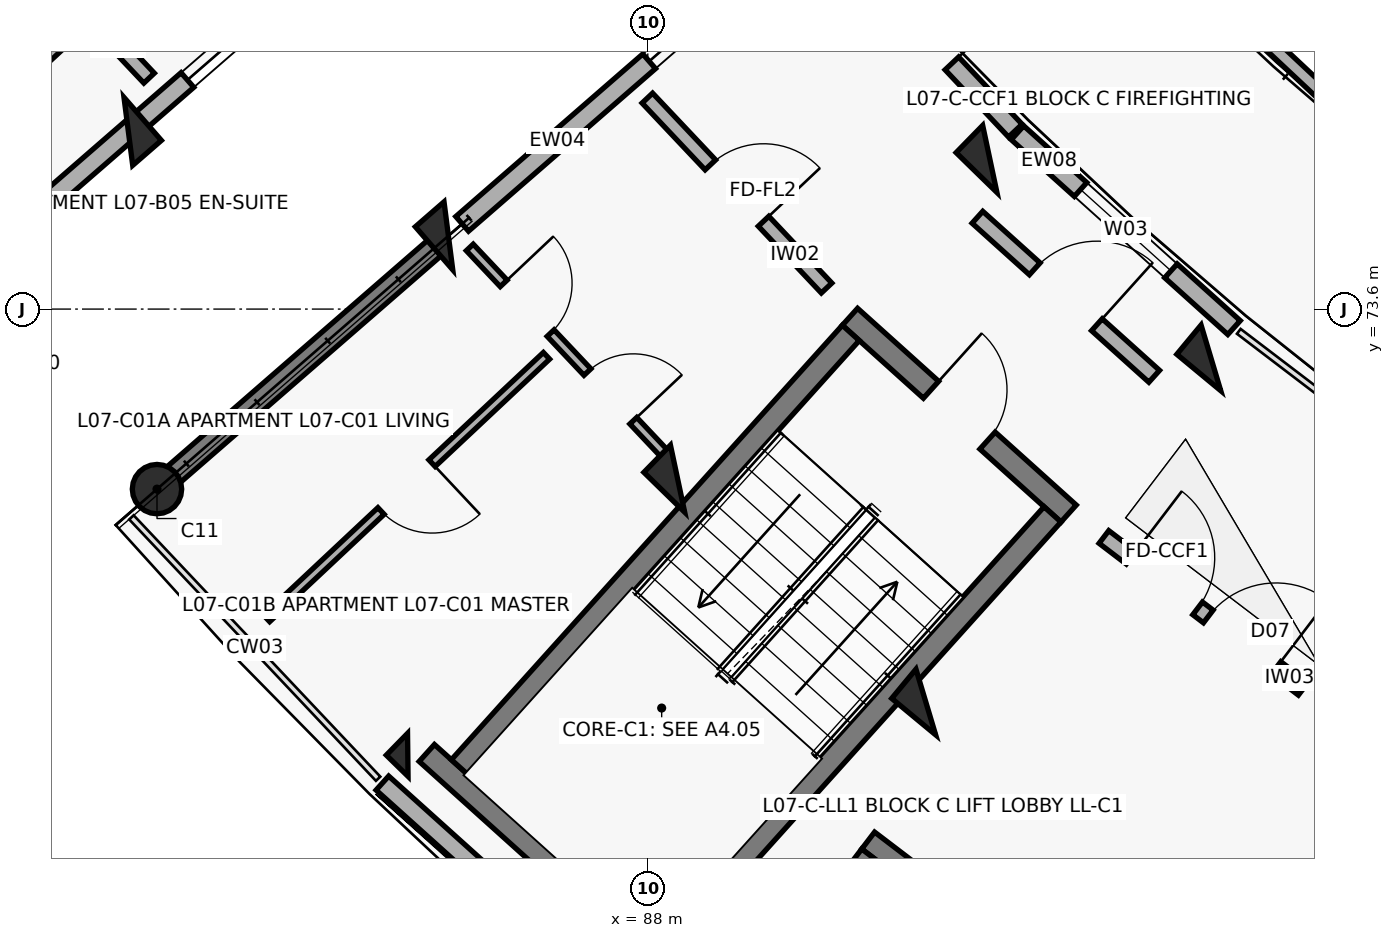
"""IFC4 building model, lengths in metres.
Left out: names, types, materials, properties, quantities, classifications, styles, units other than length and angle.
Written with IfcOpenShell. Run it as: python <this file> out.ifc"""

import sys

from ifc_helpers import new_model, si_unit, direction, frame, frame_2d, origin, origin_2d, place, context, subcontext, project, spatial, rectangle, circle, extrude, element, fill, save


model = new_model("IFC4")
c1 = context("Model", 3, precision=1e-05, world=origin(), true_north=direction((0.0, 1.0)))
c2 = subcontext(c1, "Body", "Model", "MODEL_VIEW")
j1 = project(units=[si_unit("LENGTHUNIT", "METRE"), si_unit("PLANEANGLEUNIT", "RADIAN")], contexts=[c1])
p1 = place(None, origin())
s1 = spatial("IfcSite", under=j1, at=p1, CompositionType="ELEMENT")
p2 = place(p1, origin())
s2 = spatial("IfcBuilding", under=s1, at=p2, CompositionType="ELEMENT")
p3 = place(p2, frame((0.0, 0.0, 23.6)))
s3 = spatial("IfcBuildingStorey", under=s2, at=p3, CompositionType="ELEMENT", Elevation=23.6)
for number, where, z_axis, x_axis in (
    (1, (81.166, 75.938, 0.0), (0.0, 0.0, 1.0), (0.755, 0.656, 0.0)),
    (2, (85.377, 74.564, 0.0), (0.0, 0.0, 1.0), (-0.755, -0.656, 0.0)),
):
    element("IfcColumn", number, at=place(p3, frame(where, z_axis=z_axis, x_axis=x_axis)), inside=s3, PredefinedType="COLUMN", context=c2, shape_type="SweptSolid", body=[
        extrude(rectangle(XDim=0.5, YDim=0.75, at=origin_2d()), origin(), (0.0, 0.0, 1.0), 3.1),
    ])
p4 = place(p3, frame((81.543, 71.231, 0.0), z_axis=(0.0, 0.0, 1.0), x_axis=(-0.754709580223, -0.656059028991, 0.0)))
e3 = element("IfcColumn", 3, at=p4, inside=s3, PredefinedType="COLUMN", context=c2, shape_type="SweptSolid", body=[
    extrude(circle(Radius=0.325, at=origin_2d()), origin(), (0.0, 0.0, 1.0), 3.1),
])
for number, where, z_axis, x_axis in (
    (4, (92.5, 75.576, 0.0), (0.0, 0.0, 1.0), (-0.699, -0.715, 0.0)),
    (5, (88.392, 71.369, 0.0), (0.0, 0.0, 1.0), (-0.699, -0.715, 0.0)),
):
    element("IfcColumn", number, at=place(p3, frame(where, z_axis=z_axis, x_axis=x_axis)), inside=s3, PredefinedType="COLUMN", context=c2, shape_type="SweptSolid", body=[
        extrude(rectangle(XDim=0.5, YDim=0.75, at=origin_2d()), origin(), (0.0, 0.0, 1.0), 3.1),
    ])
p5 = place(p3, frame((84.843, 67.734, 0.0), z_axis=(0.0, 0.0, 1.0), x_axis=(-0.698665066769, -0.715448897181, 0.0)))
e6 = element("IfcColumn", 6, at=p5, inside=s3, PredefinedType="COLUMN", context=c2, shape_type="SweptSolid", body=[
    extrude(rectangle(XDim=0.4, YDim=0.4, at=origin_2d()), origin(), (0.0, 0.0, 1.0), 3.1),
])
for number, where, z_axis, x_axis in (
    (7, (95.409, 72.958, 0.0), (0.0, 0.0, 1.0), (-0.638, -0.77, 0.0)),
    (8, (91.658, 68.43, 0.0), (0.0, 0.0, 1.0), (-0.638, -0.77, 0.0)),
):
    element("IfcColumn", number, at=place(p3, frame(where, z_axis=z_axis, x_axis=x_axis)), inside=s3, PredefinedType="COLUMN", context=c2, shape_type="SweptSolid", body=[
        extrude(rectangle(XDim=0.5, YDim=0.75, at=origin_2d()), origin(), (0.0, 0.0, 1.0), 3.1),
    ])
p6 = place(p3, frame((85.241, 74.446, 0.0), z_axis=(0.0, 0.0, 1.0), x_axis=(-0.754703505217, -0.65606601742, 0.0)))
e9 = element("IfcWall", 9, at=p6, inside=s3, PredefinedType="SHEAR", context=c2, shape_type="SweptSolid", body=[
    extrude(rectangle(XDim=4.72, YDim=0.27, at=frame_2d((2.36, 0.0))), origin(), (0.0, 0.0, 1.0), 2.86),
])
p7 = place(p3, frame((79.234, 74.259, 0.0), z_axis=(0.0, 0.0, 1.0), x_axis=(0.754717680958, 0.656049710044, 0.0)))
e10 = element("IfcWall", 10, at=p7, inside=s3, PredefinedType="SOLIDWALL", context=c2, shape_type="SweptSolid", body=[
    extrude(rectangle(XDim=8.2, YDim=0.255, at=frame_2d((4.1, 0.0))), origin(), (0.0, 0.0, 1.0), 2.18),
])
p8 = place(p7, frame((3.59, 0.0, 0.75)))
e11 = element("IfcOpeningElement", 11, at=p8, cuts=e10, PredefinedType="OPENING", context=c2, shape_type="SweptSolid", body=[
    extrude(rectangle(XDim=1.35, YDim=1.35, at=frame_2d((0.675, 0.675))), frame((0.0, 0.137, 0.0), z_axis=(0.0, -1.0, 0.0), x_axis=(1.0, 0.0, 0.0)), (0.0, 0.0, 1.0), 0.275),
])
p9 = place(p3, frame((90.205, 78.735, 0.0), z_axis=(0.0, 0.0, 1.0), x_axis=(0.686361600129, -0.727260444317, 0.0)))
e12 = element("IfcWall", 12, at=p9, inside=s3, PredefinedType="SOLIDWALL", context=c2, shape_type="SweptSolid", body=[
    extrude(rectangle(XDim=3.832, YDim=0.245, at=frame_2d((1.916, 0.0))), origin(), (0.0, 0.0, 1.0), 2.25),
])
p10 = place(p9, frame((1.216, 0.0, 0.0)))
e13 = element("IfcOpeningElement", 13, at=p10, cuts=e12, PredefinedType="OPENING", context=c2, shape_type="SweptSolid", body=[
    extrude(rectangle(XDim=1.4, YDim=2.15, at=frame_2d((0.7, 1.075))), frame((0.0, 0.133, 0.0), z_axis=(0.0, -1.0, 0.0), x_axis=(1.0, 0.0, 0.0)), (0.0, 0.0, 1.0), 0.265),
])
p11 = place(p3, frame((84.508, 67.363, 0.0), z_axis=(0.0, 0.0, 1.0), x_axis=(0.743387539862, -0.668860946369, 0.0)))
e14 = element("IfcWall", 14, at=p11, inside=s3, PredefinedType="SOLIDWALL", context=c2, shape_type="SweptSolid", body=[
    extrude(rectangle(XDim=4.809, YDim=0.248, at=frame_2d((2.405, 0.0))), origin(), (0.0, 0.0, 1.0), 2.25),
])
p12 = place(p3, frame((92.864, 75.92, 0.0), z_axis=(0.0, 0.0, 1.0), x_axis=(0.743363835609, -0.668887290886, 0.0)))
e15 = element("IfcWall", 15, at=p12, inside=s3, PredefinedType="SOLIDWALL", context=c2, shape_type="SweptSolid", body=[
    extrude(rectangle(XDim=3.832, YDim=0.245, at=frame_2d((1.916, 0.0))), origin(), (0.0, 0.0, 1.0), 2.25),
])
p13 = place(p12, frame((1.116, 0.0, 0.32)))
e16 = element("IfcOpeningElement", 16, at=p13, cuts=e15, PredefinedType="OPENING", context=c2, shape_type="SweptSolid", body=[
    extrude(rectangle(XDim=1.6, YDim=1.5, at=frame_2d((0.8, 0.75))), frame((0.0, 0.133, 0.0), z_axis=(0.0, -1.0, 0.0), x_axis=(1.0, 0.0, 0.0)), (0.0, 0.0, 1.0), 0.265),
])
p14 = place(p3, frame((89.633, 78.264, 0.0), z_axis=(0.0, 0.0, 1.0), x_axis=(-0.754709658894, -0.65605893849, 0.0)))
e17 = element("IfcWall", 17, at=p14, inside=s3, PredefinedType="SOLIDWALL", context=c2, shape_type="SweptSolid", body=[
    extrude(rectangle(XDim=5.4, YDim=0.255, at=frame_2d((2.7, 0.0))), origin(), (0.0, 0.0, 1.0), 2.18),
])
p15 = place(p14, frame((0.79, 0.0, 0.75)))
e18 = element("IfcOpeningElement", 18, at=p15, cuts=e17, PredefinedType="OPENING", context=c2, shape_type="SweptSolid", body=[
    extrude(rectangle(XDim=1.35, YDim=1.35, at=frame_2d((0.675, 0.675))), frame((0.0, 0.137, 0.0), z_axis=(0.0, -1.0, 0.0), x_axis=(1.0, 0.0, 0.0)), (0.0, 0.0, 1.0), 0.275),
])
p16 = place(p3, frame((92.38, 80.652, 0.0), z_axis=(0.0, 0.0, 1.0), x_axis=(0.729564048979, -0.68391249326, 0.0)))
e19 = element("IfcWall", 19, at=p16, inside=s3, PredefinedType="PARAPET", context=c2, shape_type="SweptSolid", body=[
    extrude(rectangle(XDim=9.075, YDim=0.18, at=frame_2d((4.538, 0.0))), origin(), (0.0, 0.0, 1.0), 0.25),
])
p17 = place(p3, frame((90.66, 73.499, 0.0), z_axis=(0.0, 0.0, 1.0), x_axis=(0.743375696158, -0.668874109501, 0.0)))
e20 = element("IfcWall", 20, at=p17, inside=s3, PredefinedType="SHEAR", context=c2, shape_type="SweptSolid", body=[
    extrude(rectangle(XDim=3.87, YDim=0.3, at=frame_2d((1.935, 0.0))), origin(), (0.0, 0.0, 1.0), 3.1),
])
p18 = place(p17, frame((1.435, 0.0, 0.0)))
e21 = element("IfcOpeningElement", 21, at=p18, cuts=e20, PredefinedType="OPENING", context=c2, shape_type="SweptSolid", body=[
    extrude(rectangle(XDim=1.0, YDim=2.15, at=frame_2d((0.5, 1.075))), frame((0.0, 0.16, 0.0), z_axis=(0.0, -1.0, 0.0), x_axis=(1.0, 0.0, 0.0)), (0.0, 0.0, 1.0), 0.32),
])
p19 = place(p3, frame((85.093, 67.76, 0.0), z_axis=(0.0, 0.0, 1.0), x_axis=(0.743372896184, -0.668877221333, 0.0)))
e22 = element("IfcWall", 22, at=p19, inside=s3, PredefinedType="SHEAR", context=c2, shape_type="SweptSolid", body=[
    extrude(rectangle(XDim=4.47, YDim=0.3, at=frame_2d((2.235, 0.0))), origin(), (0.0, 0.0, 1.0), 3.1),
])
p20 = place(p3, frame((90.671, 73.287, 0.0), z_axis=(0.0, 0.0, 1.0), x_axis=(-0.668885797871, -0.743365179038, 0.0)))
e23 = element("IfcWall", 23, at=p20, inside=s3, PredefinedType="SHEAR", context=c2, shape_type="SweptSolid", body=[
    extrude(rectangle(XDim=7.69, YDim=0.3, at=frame_2d((3.845, 0.0))), origin(), (0.0, 0.0, 1.0), 3.1),
])
p21 = place(p3, frame((93.325, 70.899, 0.0), z_axis=(0.0, 0.0, 1.0), x_axis=(-0.668868253964, -0.743380964808, 0.0)))
e24 = element("IfcWall", 24, at=p21, inside=s3, PredefinedType="SHEAR", context=c2, shape_type="SweptSolid", body=[
    extrude(rectangle(XDim=7.69, YDim=0.3, at=frame_2d((3.845, 0.0))), origin(), (0.0, 0.0, 1.0), 3.1),
])
p22 = place(p3, frame((90.899, 66.607, 0.0), z_axis=(0.0, 0.0, 1.0), x_axis=(0.795439986025, -0.606032365994, 0.0)))
e25 = element("IfcWall", 25, at=p22, inside=s3, PredefinedType="SHEAR", context=c2, shape_type="SweptSolid", body=[
    extrude(rectangle(XDim=3.39, YDim=0.28, at=frame_2d((1.695, 0.0))), origin(), (0.0, 0.0, 1.0), 3.1),
])
p23 = place(p22, frame((1.095, 0.0, 0.0)))
e26 = element("IfcOpeningElement", 26, at=p23, cuts=e25, PredefinedType="OPENING", context=c2, shape_type="SweptSolid", body=[
    extrude(rectangle(XDim=1.2, YDim=2.15, at=frame_2d((0.6, 1.075))), frame((0.0, 0.15, 0.0), z_axis=(0.0, -1.0, 0.0), x_axis=(1.0, 0.0, 0.0)), (0.0, 0.0, 1.0), 0.3),
])
p24 = place(p3, frame((90.926, 66.411, 0.0), z_axis=(0.0, 0.0, 1.0), x_axis=(-0.605948992168, -0.795503500238, 0.0)))
e27 = element("IfcWall", 27, at=p24, inside=s3, PredefinedType="SHEAR", context=c2, shape_type="SweptSolid", body=[
    extrude(rectangle(XDim=2.03, YDim=0.28, at=frame_2d((1.015, 0.0))), origin(), (0.0, 0.0, 1.0), 3.1),
])
p25 = place(p3, frame((79.195, 79.016, 0.0), z_axis=(0.0, 0.0, 1.0), x_axis=(0.686307658735, -0.727311348434, 0.0)))
e28 = element("IfcWall", 28, at=p25, inside=s3, PredefinedType="SOLIDWALL", context=c2, shape_type="SweptSolid", body=[
    extrude(rectangle(XDim=3.269, YDim=0.19, at=frame_2d((1.634, 0.0))), origin(), (0.0, 0.0, 1.0), 2.08),
])
p26 = place(p25, frame((1.184, 0.0, 0.0)))
e29 = element("IfcOpeningElement", 29, at=p26, cuts=e28, PredefinedType="OPENING", context=c2, shape_type="SweptSolid", body=[
    extrude(rectangle(XDim=0.9, YDim=2.1, at=frame_2d((0.45, 1.05))), frame((0.0, 0.105, 0.0), z_axis=(0.0, -1.0, 0.0), x_axis=(1.0, 0.0, 0.0)), (0.0, 0.0, 1.0), 0.21),
])
p27 = place(p3, frame((78.163, 75.139, 0.0), z_axis=(0.0, 0.0, 1.0), x_axis=(0.734519733107, 0.678587327967, 0.0)))
e30 = element("IfcWall", 30, at=p27, inside=s3, PredefinedType="PARTITIONING", context=c2, shape_type="SweptSolid", body=[
    extrude(rectangle(XDim=3.3, YDim=0.145, at=frame_2d((1.65, 0.0))), origin(), (0.0, 0.0, 1.0), 2.08),
])
p28 = place(p27, frame((1.21, 0.0, 0.0)))
e31 = element("IfcOpeningElement", 31, at=p28, cuts=e30, PredefinedType="OPENING", context=c2, shape_type="SweptSolid", body=[
    extrude(rectangle(XDim=0.88, YDim=2.1, at=frame_2d((0.44, 1.05))), frame((0.0, 0.083, 0.0), z_axis=(0.0, -1.0, 0.0), x_axis=(1.0, 0.0, 0.0)), (0.0, 0.0, 1.0), 0.165),
])
p29 = place(p3, frame((87.994, 76.376, 0.0), z_axis=(0.0, 0.0, 1.0), x_axis=(0.686310507227, -0.727308660522, 0.0)))
e32 = element("IfcWall", 32, at=p29, inside=s3, PredefinedType="SOLIDWALL", context=c2, shape_type="SweptSolid", body=[
    extrude(rectangle(XDim=3.436, YDim=0.19, at=frame_2d((1.718, 0.0))), origin(), (0.0, 0.0, 1.0), 2.08),
])
p30 = place(p29, frame((1.208, 0.0, 0.0)))
e33 = element("IfcOpeningElement", 33, at=p30, cuts=e32, PredefinedType="OPENING", context=c2, shape_type="SweptSolid", body=[
    extrude(rectangle(XDim=1.02, YDim=2.15, at=frame_2d((0.51, 1.075))), frame((0.0, 0.105, 0.0), z_axis=(0.0, -1.0, 0.0), x_axis=(1.0, 0.0, 0.0)), (0.0, 0.0, 1.0), 0.21),
])
p31 = place(p3, frame((85.658, 74.411, 0.0), z_axis=(0.0, 0.0, 1.0), x_axis=(0.686364008772, -0.727258171121, 0.0)))
e34 = element("IfcWall", 34, at=p31, inside=s3, PredefinedType="PARTITIONING", context=c2, shape_type="SweptSolid", body=[
    extrude(rectangle(XDim=3.785, YDim=0.125, at=frame_2d((1.893, 0.0))), origin(), (0.0, 0.0, 1.0), 2.08),
])
p32 = place(p31, frame((0.65, 0.0, 0.0)))
e35 = element("IfcOpeningElement", 35, at=p32, cuts=e34, PredefinedType="OPENING", context=c2, shape_type="SweptSolid", body=[
    extrude(rectangle(XDim=0.9, YDim=2.1, at=frame_2d((0.45, 1.05))), frame((0.0, 0.073, 0.0), z_axis=(0.0, -1.0, 0.0), x_axis=(1.0, 0.0, 0.0)), (0.0, 0.0, 1.0), 0.145),
])
p33 = place(p31, frame((2.255, 0.0, 0.0)))
e36 = element("IfcOpeningElement", 36, at=p33, cuts=e34, PredefinedType="OPENING", context=c2, shape_type="SweptSolid", body=[
    extrude(rectangle(XDim=0.88, YDim=2.1, at=frame_2d((0.44, 1.05))), frame((0.0, 0.073, 0.0), z_axis=(0.0, -1.0, 0.0), x_axis=(1.0, 0.0, 0.0)), (0.0, 0.0, 1.0), 0.145),
])
p34 = place(p3, frame((86.667, 72.985, 0.0), z_axis=(0.0, 0.0, 1.0), x_axis=(-0.72936983679, -0.684119610288, 0.0)))
e37 = element("IfcWall", 37, at=p34, inside=s3, PredefinedType="PARTITIONING", context=c2, shape_type="SweptSolid", body=[
    extrude(rectangle(XDim=5.05, YDim=0.12, at=frame_2d((2.525, 0.0))), origin(), (0.0, 0.0, 1.0), 2.08),
])
p35 = place(p34, frame((2.065, 0.0, 0.0)))
e38 = element("IfcOpeningElement", 38, at=p35, cuts=e37, PredefinedType="OPENING", context=c2, shape_type="SweptSolid", body=[
    extrude(rectangle(XDim=0.92, YDim=2.1, at=frame_2d((0.46, 1.05))), frame((0.0, 0.07, 0.0), z_axis=(0.0, -1.0, 0.0), x_axis=(1.0, 0.0, 0.0)), (0.0, 0.0, 1.0), 0.14),
])
p36 = place(p3, frame((92.337, 74.808, 0.0), z_axis=(0.0, 0.0, 1.0), x_axis=(0.743348465558, -0.668904371904, 0.0)))
e39 = element("IfcWall", 39, at=p36, inside=s3, PredefinedType="SOLIDWALL", context=c2, shape_type="SweptSolid", body=[
    extrude(rectangle(XDim=3.129, YDim=0.21, at=frame_2d((1.564, 0.0))), origin(), (0.0, 0.0, 1.0), 2.08),
])
p37 = place(p36, frame((1.014, 0.0, 0.0)))
e40 = element("IfcOpeningElement", 40, at=p37, cuts=e39, PredefinedType="OPENING", context=c2, shape_type="SweptSolid", body=[
    extrude(rectangle(XDim=1.1, YDim=2.15, at=frame_2d((0.55, 1.075))), frame((0.0, 0.115, 0.0), z_axis=(0.0, -1.0, 0.0), x_axis=(1.0, 0.0, 0.0)), (0.0, 0.0, 1.0), 0.23),
])
p38 = place(p3, frame((94.001, 70.602, 0.0), z_axis=(0.0, 0.0, 1.0), x_axis=(0.795498026433, -0.605956178235, 0.0)))
e41 = element("IfcWall", 41, at=p38, inside=s3, PredefinedType="SOLIDWALL", context=c2, shape_type="SweptSolid", body=[
    extrude(rectangle(XDim=3.296, YDim=0.21, at=frame_2d((1.648, 0.0))), origin(), (0.0, 0.0, 1.0), 2.08),
])
p39 = place(p38, frame((0.45, 0.0, 0.0)))
e42 = element("IfcOpeningElement", 42, at=p39, cuts=e41, PredefinedType="OPENING", context=c2, shape_type="SweptSolid", body=[
    extrude(rectangle(XDim=1.1, YDim=2.15, at=frame_2d((0.55, 1.075))), frame((0.0, 0.115, 0.0), z_axis=(0.0, -1.0, 0.0), x_axis=(1.0, 0.0, 0.0)), (0.0, 0.0, 1.0), 0.23),
])
p40 = place(p38, frame((1.726, 0.0, 0.0)))
e43 = element("IfcOpeningElement", 43, at=p40, cuts=e41, PredefinedType="OPENING", context=c2, shape_type="SweptSolid", body=[
    extrude(rectangle(XDim=1.12, YDim=2.15, at=frame_2d((0.56, 1.075))), frame((0.0, 0.115, 0.0), z_axis=(0.0, -1.0, 0.0), x_axis=(1.0, 0.0, 0.0)), (0.0, 0.0, 1.0), 0.23),
])
p41 = place(p3, frame((98.504, 67.072, 0.0), z_axis=(0.0, 0.0, 1.0), x_axis=(-0.540338452216, -0.841447774408, 0.0)))
e44 = element("IfcWall", 44, at=p41, inside=s3, PredefinedType="PARTITIONING", context=c2, shape_type="SweptSolid", body=[
    extrude(rectangle(XDim=7.95, YDim=0.14, at=frame_2d((3.975, 0.0))), origin(), (0.0, 0.0, 1.0), 2.08),
])
p42 = place(p41, frame((6.05, 0.0, 0.0)))
e45 = element("IfcOpeningElement", 45, at=p42, cuts=e44, PredefinedType="OPENING", context=c2, shape_type="SweptSolid", body=[
    extrude(rectangle(XDim=0.92, YDim=2.1, at=frame_2d((0.46, 1.05))), frame((0.0, 0.08, 0.0), z_axis=(0.0, -1.0, 0.0), x_axis=(1.0, 0.0, 0.0)), (0.0, 0.0, 1.0), 0.16),
])
p43 = place(p8, origin())
e46 = element("IfcWindow", 46, at=p43, inside=s3, PartitioningType="DOUBLE_PANEL_VERTICAL", PredefinedType="WINDOW", context=c2, shape_type="SweptSolid", body=[
    extrude(rectangle(XDim=1.35, YDim=1.35, at=frame_2d((0.675, 0.675))), frame((0.0, 0.03, 0.0), z_axis=(0.0, -1.0, 0.0), x_axis=(1.0, 0.0, 0.0)), (0.0, 0.0, 1.0), 0.06),
])
fill(e11, e46)
p44 = place(p10, origin())
e47 = element("IfcDoor", 47, at=p44, inside=s3, OperationType="DOUBLE_DOOR_SINGLE_SWING", PredefinedType="DOOR", context=c2, shape_type="SweptSolid", body=[
    extrude(rectangle(XDim=1.4, YDim=2.15, at=frame_2d((0.7, 1.075))), frame((0.0, 0.025, 0.0), z_axis=(0.0, -1.0, 0.0), x_axis=(1.0, 0.0, 0.0)), (0.0, 0.0, 1.0), 0.05),
])
fill(e13, e47)
p45 = place(p13, origin())
e48 = element("IfcWindow", 48, at=p45, inside=s3, PartitioningType="DOUBLE_PANEL_VERTICAL", PredefinedType="WINDOW", context=c2, shape_type="SweptSolid", body=[
    extrude(rectangle(XDim=1.6, YDim=1.5, at=frame_2d((0.8, 0.75))), frame((0.0, 0.03, 0.0), z_axis=(0.0, -1.0, 0.0), x_axis=(1.0, 0.0, 0.0)), (0.0, 0.0, 1.0), 0.06),
])
fill(e16, e48)
p46 = place(p15, origin())
e49 = element("IfcWindow", 49, at=p46, inside=s3, PartitioningType="DOUBLE_PANEL_VERTICAL", PredefinedType="WINDOW", context=c2, shape_type="SweptSolid", body=[
    extrude(rectangle(XDim=1.35, YDim=1.35, at=frame_2d((0.675, 0.675))), frame((0.0, 0.03, 0.0), z_axis=(0.0, -1.0, 0.0), x_axis=(1.0, 0.0, 0.0)), (0.0, 0.0, 1.0), 0.06),
])
fill(e18, e49)
p47 = place(p18, origin())
e50 = element("IfcDoor", 50, at=p47, inside=s3, OperationType="SINGLE_SWING_LEFT", PredefinedType="DOOR", context=c2, shape_type="SweptSolid", body=[
    extrude(rectangle(XDim=1.0, YDim=2.15, at=frame_2d((0.5, 1.075))), frame((0.0, 0.025, 0.0), z_axis=(0.0, -1.0, 0.0), x_axis=(1.0, 0.0, 0.0)), (0.0, 0.0, 1.0), 0.05),
])
fill(e21, e50)
p48 = place(p30, origin())
e51 = element("IfcDoor", 51, at=p48, inside=s3, OperationType="SINGLE_SWING_RIGHT", PredefinedType="DOOR", context=c2, shape_type="SweptSolid", body=[
    extrude(rectangle(XDim=1.02, YDim=2.15, at=frame_2d((0.51, 1.075))), frame((0.0, 0.025, 0.0), z_axis=(0.0, -1.0, 0.0), x_axis=(1.0, 0.0, 0.0)), (0.0, 0.0, 1.0), 0.05),
])
fill(e33, e51)
p49 = place(p32, origin())
e52 = element("IfcDoor", 52, at=p49, inside=s3, OperationType="SINGLE_SWING_LEFT", PredefinedType="DOOR", context=c2, shape_type="SweptSolid", body=[
    extrude(rectangle(XDim=0.9, YDim=2.1, at=frame_2d((0.45, 1.05))), frame((0.0, 0.025, 0.0), z_axis=(0.0, -1.0, 0.0), x_axis=(1.0, 0.0, 0.0)), (0.0, 0.0, 1.0), 0.05),
])
fill(e35, e52)
p50 = place(p33, origin())
e53 = element("IfcDoor", 53, at=p50, inside=s3, OperationType="SINGLE_SWING_RIGHT", PredefinedType="DOOR", context=c2, shape_type="SweptSolid", body=[
    extrude(rectangle(XDim=0.88, YDim=2.1, at=frame_2d((0.44, 1.05))), frame((0.0, 0.025, 0.0), z_axis=(0.0, -1.0, 0.0), x_axis=(1.0, 0.0, 0.0)), (0.0, 0.0, 1.0), 0.05),
])
fill(e36, e53)
p51 = place(p35, origin())
e54 = element("IfcDoor", 54, at=p51, inside=s3, OperationType="SINGLE_SWING_LEFT", PredefinedType="DOOR", context=c2, shape_type="SweptSolid", body=[
    extrude(rectangle(XDim=0.92, YDim=2.1, at=frame_2d((0.46, 1.05))), frame((0.0, 0.025, 0.0), z_axis=(0.0, -1.0, 0.0), x_axis=(1.0, 0.0, 0.0)), (0.0, 0.0, 1.0), 0.05),
])
fill(e38, e54)
p52 = place(p37, origin())
e55 = element("IfcDoor", 55, at=p52, inside=s3, OperationType="SINGLE_SWING_RIGHT", PredefinedType="DOOR", context=c2, shape_type="SweptSolid", body=[
    extrude(rectangle(XDim=1.1, YDim=2.15, at=frame_2d((0.55, 1.075))), frame((0.0, 0.025, 0.0), z_axis=(0.0, -1.0, 0.0), x_axis=(1.0, 0.0, 0.0)), (0.0, 0.0, 1.0), 0.05),
])
fill(e40, e55)
p53 = place(p39, origin())
e56 = element("IfcDoor", 56, at=p53, inside=s3, OperationType="SINGLE_SWING_LEFT", PredefinedType="DOOR", context=c2, shape_type="SweptSolid", body=[
    extrude(rectangle(XDim=1.1, YDim=2.15, at=frame_2d((0.55, 1.075))), frame((0.0, 0.025, 0.0), z_axis=(0.0, -1.0, 0.0), x_axis=(1.0, 0.0, 0.0)), (0.0, 0.0, 1.0), 0.05),
])
fill(e42, e56)
p54 = place(p40, origin())
e57 = element("IfcDoor", 57, at=p54, inside=s3, OperationType="SINGLE_SWING_RIGHT", PredefinedType="DOOR", context=c2, shape_type="SweptSolid", body=[
    extrude(rectangle(XDim=1.12, YDim=2.15, at=frame_2d((0.56, 1.075))), frame((0.0, 0.025, 0.0), z_axis=(0.0, -1.0, 0.0), x_axis=(1.0, 0.0, 0.0)), (0.0, 0.0, 1.0), 0.05),
])
fill(e43, e57)
save(model, sys.argv[1])
